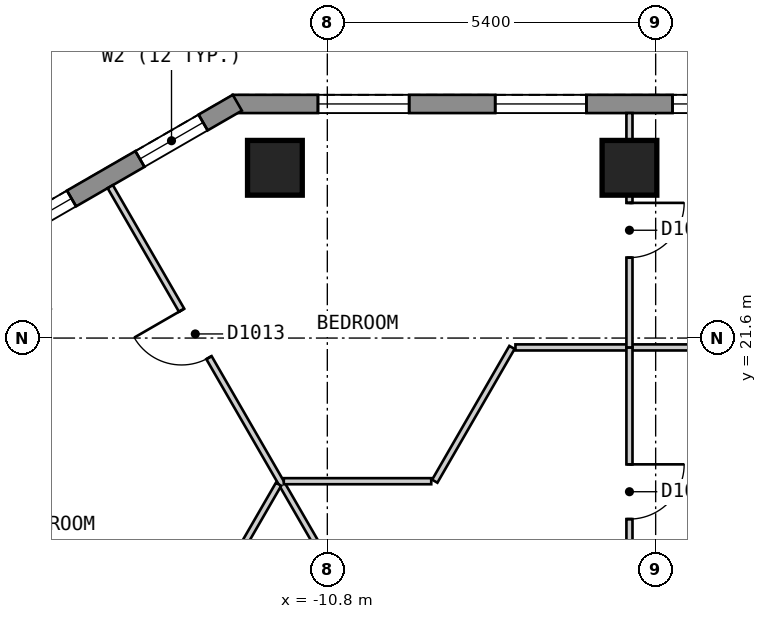
"""IFC4 building model, lengths in metres.
Left out: names, types, materials, properties, quantities, classifications, styles, units other than length and angle.
Written with IfcOpenShell. Run it as: python <this file> out.ifc"""

import sys

from ifc_helpers import new_model, si_unit, direction, frame, frame_2d, origin, origin_2d, place, context, subcontext, project, spatial, polyline, rectangle, outline, extrude, element, fill, save


model = new_model("IFC4")
c1 = context("Model", 3, precision=1e-05, world=origin(), true_north=direction((0.0, 1.0)))
c2 = subcontext(c1, "Body", "Model", "MODEL_VIEW")
j1 = project(units=[si_unit("LENGTHUNIT", "METRE"), si_unit("PLANEANGLEUNIT", "RADIAN")], contexts=[c1])
p1 = place(None, origin())
s1 = spatial("IfcSite", under=j1, at=p1, CompositionType="ELEMENT")
p2 = place(p1, origin())
s2 = spatial("IfcBuilding", under=s1, at=p2, CompositionType="ELEMENT")
p3 = place(p2, frame((0.0, 0.0, 126.6)))
s3 = spatial("IfcBuildingStorey", under=s2, at=p3, CompositionType="ELEMENT", Elevation=126.6)
for number, where, z_axis, x_axis in (
    (1, (-5.831, 24.4, 0.0), (0.0, 0.0, 1.0), (-1.0, 0.0, 0.0)),
    (2, (-11.662, 24.4, 0.0), (0.0, 0.0, 1.0), (-1.0, 0.0, 0.0)),
):
    element("IfcColumn", number, at=place(p3, frame(where, z_axis=z_axis, x_axis=x_axis)), inside=s3, PredefinedType="COLUMN", context=c2, shape_type="SweptSolid", body=[
        extrude(rectangle(XDim=0.9, YDim=0.9, at=origin_2d()), origin(), (0.0, 0.0, 1.0), 3.0),
    ])
p4 = place(p3, frame((12.355, 25.45, 0.0), z_axis=(0.0, 0.0, 1.0), x_axis=(-1.0, 0.0, 0.0)))
e3 = element("IfcWall", 3, at=p4, inside=s3, PredefinedType="SOLIDWALL", context=c2, shape_type="SweptSolid", body=[
    extrude(outline(polyline([(0.0, -0.15), (24.71, -0.15), (24.63, 0.15), (0.08, 0.15), (0.0, -0.15)])), origin(), (0.0, 0.0, 1.0), 2.7),
])
p5 = place(p4, frame((1.401, 0.0, 0.15)))
e4 = element("IfcOpeningElement", 4, at=p5, cuts=e3, PredefinedType="OPENING", context=c2, shape_type="SweptSolid", body=[
    extrude(rectangle(XDim=1.5, YDim=2.1, at=frame_2d((0.75, 1.05))), frame((0.0, 0.16, 0.0), z_axis=(0.0, -1.0, 0.0), x_axis=(1.0, 0.0, 0.0)), (0.0, 0.0, 1.0), 0.32),
])
p6 = place(p4, frame((4.316, 0.0, 0.15)))
e5 = element("IfcOpeningElement", 5, at=p6, cuts=e3, PredefinedType="OPENING", context=c2, shape_type="SweptSolid", body=[
    extrude(rectangle(XDim=1.5, YDim=2.1, at=frame_2d((0.75, 1.05))), frame((0.0, 0.16, 0.0), z_axis=(0.0, -1.0, 0.0), x_axis=(1.0, 0.0, 0.0)), (0.0, 0.0, 1.0), 0.32),
])
p7 = place(p4, frame((7.232, 0.0, 0.15)))
e6 = element("IfcOpeningElement", 6, at=p7, cuts=e3, PredefinedType="OPENING", context=c2, shape_type="SweptSolid", body=[
    extrude(rectangle(XDim=1.5, YDim=2.1, at=frame_2d((0.75, 1.05))), frame((0.0, 0.16, 0.0), z_axis=(0.0, -1.0, 0.0), x_axis=(1.0, 0.0, 0.0)), (0.0, 0.0, 1.0), 0.32),
])
p8 = place(p4, frame((10.147, 0.0, 0.15)))
e7 = element("IfcOpeningElement", 7, at=p8, cuts=e3, PredefinedType="OPENING", context=c2, shape_type="SweptSolid", body=[
    extrude(rectangle(XDim=1.5, YDim=2.1, at=frame_2d((0.75, 1.05))), frame((0.0, 0.16, 0.0), z_axis=(0.0, -1.0, 0.0), x_axis=(1.0, 0.0, 0.0)), (0.0, 0.0, 1.0), 0.32),
])
p9 = place(p4, frame((13.063, 0.0, 0.15)))
e8 = element("IfcOpeningElement", 8, at=p9, cuts=e3, PredefinedType="OPENING", context=c2, shape_type="SweptSolid", body=[
    extrude(rectangle(XDim=1.5, YDim=2.1, at=frame_2d((0.75, 1.05))), frame((0.0, 0.16, 0.0), z_axis=(0.0, -1.0, 0.0), x_axis=(1.0, 0.0, 0.0)), (0.0, 0.0, 1.0), 0.32),
])
p10 = place(p4, frame((15.978, 0.0, 0.15)))
e9 = element("IfcOpeningElement", 9, at=p10, cuts=e3, PredefinedType="OPENING", context=c2, shape_type="SweptSolid", body=[
    extrude(rectangle(XDim=1.5, YDim=2.1, at=frame_2d((0.75, 1.05))), frame((0.0, 0.16, 0.0), z_axis=(0.0, -1.0, 0.0), x_axis=(1.0, 0.0, 0.0)), (0.0, 0.0, 1.0), 0.32),
])
p11 = place(p4, frame((18.894, 0.0, 0.15)))
e10 = element("IfcOpeningElement", 10, at=p11, cuts=e3, PredefinedType="OPENING", context=c2, shape_type="SweptSolid", body=[
    extrude(rectangle(XDim=1.5, YDim=2.1, at=frame_2d((0.75, 1.05))), frame((0.0, 0.16, 0.0), z_axis=(0.0, -1.0, 0.0), x_axis=(1.0, 0.0, 0.0)), (0.0, 0.0, 1.0), 0.32),
])
p12 = place(p4, frame((21.809, 0.0, 0.15)))
e11 = element("IfcOpeningElement", 11, at=p12, cuts=e3, PredefinedType="OPENING", context=c2, shape_type="SweptSolid", body=[
    extrude(rectangle(XDim=1.5, YDim=2.1, at=frame_2d((0.75, 1.05))), frame((0.0, 0.16, 0.0), z_axis=(0.0, -1.0, 0.0), x_axis=(1.0, 0.0, 0.0)), (0.0, 0.0, 1.0), 0.32),
])
p13 = place(p3, frame((-12.28, 25.47, 0.0), z_axis=(0.0, 0.0, 1.0), x_axis=(-0.866022959057, -0.500004234368, 0.0)))
e12 = element("IfcWall", 12, at=p13, inside=s3, PredefinedType="SOLIDWALL", context=c2, shape_type="SweptSolid", body=[
    extrude(outline(polyline([(0.0, -0.15), (5.0, -0.15), (4.92, 0.15), (0.08, 0.15), (0.0, -0.15)])), origin(), (0.0, 0.0, 1.0), 2.7),
])
p14 = place(p13, frame((0.65, 0.0, 0.15)))
e13 = element("IfcOpeningElement", 13, at=p14, cuts=e12, PredefinedType="OPENING", context=c2, shape_type="SweptSolid", body=[
    extrude(rectangle(XDim=1.2, YDim=2.1, at=frame_2d((0.6, 1.05))), frame((0.0, 0.16, 0.0), z_axis=(0.0, -1.0, 0.0), x_axis=(1.0, 0.0, 0.0)), (0.0, 0.0, 1.0), 0.32),
])
p15 = place(p13, frame((3.149, 0.0, 0.15)))
e14 = element("IfcOpeningElement", 14, at=p15, cuts=e12, PredefinedType="OPENING", context=c2, shape_type="SweptSolid", body=[
    extrude(rectangle(XDim=1.2, YDim=2.1, at=frame_2d((0.6, 1.05))), frame((0.0, 0.16, 0.0), z_axis=(0.0, -1.0, 0.0), x_axis=(1.0, 0.0, 0.0)), (0.0, 0.0, 1.0), 0.32),
])
p16 = place(p3, frame((-14.37, 24.09, 0.0), z_axis=(0.0, 0.0, 1.0), x_axis=(0.50002438799, -0.866011322914, 0.0)))
e15 = element("IfcWall", 15, at=p16, inside=s3, PredefinedType="PARTITIONING", context=c2, shape_type="SweptSolid", body=[
    extrude(rectangle(XDim=10.266, YDim=0.1, at=frame_2d((5.133, 0.0))), origin(), (0.0, 0.0, 1.0), 2.7),
])
p17 = place(p16, frame((2.347, 0.0, 0.0)))
e16 = element("IfcOpeningElement", 16, at=p17, cuts=e15, PredefinedType="OPENING", context=c2, shape_type="SweptSolid", body=[
    extrude(rectangle(XDim=0.9, YDim=2.1, at=frame_2d((0.45, 1.05))), frame((0.0, 0.06, 0.0), z_axis=(0.0, -1.0, 0.0), x_axis=(1.0, 0.0, 0.0)), (0.0, 0.0, 1.0), 0.12),
])
p18 = place(p3, frame((-11.516, 19.246, 0.0), z_axis=(0.0, 0.0, 1.0), x_axis=(1.0, 0.0, 0.0)))
e17 = element("IfcWall", 17, at=p18, inside=s3, PredefinedType="PARTITIONING", context=c2, shape_type="SweptSolid", body=[
    extrude(rectangle(XDim=2.425, YDim=0.1, at=frame_2d((1.212, 0.0))), origin(), (0.0, 0.0, 1.0), 2.7),
])
p19 = place(p3, frame((-7.706, 21.446, 0.0), z_axis=(0.0, 0.0, 1.0), x_axis=(1.0, 0.0, 0.0)))
e18 = element("IfcWall", 18, at=p19, inside=s3, PredefinedType="PARTITIONING", context=c2, shape_type="SweptSolid", body=[
    extrude(rectangle(XDim=13.537, YDim=0.1, at=frame_2d((6.769, 0.0))), origin(), (0.0, 0.0, 1.0), 2.7),
])
p20 = place(p19, frame((4.35, 0.0, 0.0)))
e19 = element("IfcOpeningElement", 19, at=p20, cuts=e18, PredefinedType="OPENING", context=c2, shape_type="SweptSolid", body=[
    extrude(rectangle(XDim=0.9, YDim=2.1, at=frame_2d((0.45, 1.05))), frame((0.0, 0.06, 0.0), z_axis=(0.0, -1.0, 0.0), x_axis=(1.0, 0.0, 0.0)), (0.0, 0.0, 1.0), 0.12),
])
p21 = place(p3, frame((-9.033, 19.246, 0.0), z_axis=(0.0, 0.0, 1.0), x_axis=(0.499963722229, 0.866046347752, 0.0)))
e20 = element("IfcWall", 20, at=p21, inside=s3, PredefinedType="PARTITIONING", context=c2, shape_type="SweptSolid", body=[
    extrude(rectangle(XDim=2.54, YDim=0.1, at=frame_2d((1.27, 0.0))), origin(), (0.0, 0.0, 1.0), 2.7),
])
p22 = place(p3, frame((-14.222, 14.659, 0.0), z_axis=(0.0, 0.0, 1.0), x_axis=(0.500053212623, 0.865994679283, 0.0)))
e21 = element("IfcWall", 21, at=p22, inside=s3, PredefinedType="PARTITIONING", context=c2, shape_type="SweptSolid", body=[
    extrude(rectangle(XDim=5.239, YDim=0.1, at=frame_2d((2.62, 0.0))), origin(), (0.0, 0.0, 1.0), 2.7),
])
p23 = place(p22, frame((2.198, 0.0, 0.0)))
e22 = element("IfcOpeningElement", 22, at=p23, cuts=e21, PredefinedType="OPENING", context=c2, shape_type="SweptSolid", body=[
    extrude(rectangle(XDim=0.8, YDim=2.1, at=frame_2d((0.4, 1.05))), frame((0.0, 0.06, 0.0), z_axis=(0.0, -1.0, 0.0), x_axis=(1.0, 0.0, 0.0)), (0.0, 0.0, 1.0), 0.12),
])
p24 = place(p3, frame((-5.831, 16.9, 0.0), z_axis=(0.0, 0.0, 1.0), x_axis=(0.0, 1.0, 0.0)))
e23 = element("IfcWall", 23, at=p24, inside=s3, PredefinedType="PARTITIONING", context=c2, shape_type="SweptSolid", body=[
    extrude(rectangle(XDim=4.546, YDim=0.1, at=frame_2d((2.273, 0.0))), origin(), (0.0, 0.0, 1.0), 2.7),
])
p25 = place(p24, frame((1.723, 0.0, 0.0)))
e24 = element("IfcOpeningElement", 24, at=p25, cuts=e23, PredefinedType="OPENING", context=c2, shape_type="SweptSolid", body=[
    extrude(rectangle(XDim=0.9, YDim=2.1, at=frame_2d((0.45, 1.05))), frame((0.0, 0.06, 0.0), z_axis=(0.0, -1.0, 0.0), x_axis=(1.0, 0.0, 0.0)), (0.0, 0.0, 1.0), 0.12),
])
p26 = place(p3, frame((-5.831, 21.446, 0.0), z_axis=(0.0, 0.0, 1.0), x_axis=(0.0, 1.0, 0.0)))
e25 = element("IfcWall", 25, at=p26, inside=s3, PredefinedType="PARTITIONING", context=c2, shape_type="SweptSolid", body=[
    extrude(rectangle(XDim=3.854, YDim=0.1, at=frame_2d((1.927, 0.0))), origin(), (0.0, 0.0, 1.0), 2.7),
])
p27 = place(p26, frame((1.477, 0.0, 0.0)))
e26 = element("IfcOpeningElement", 26, at=p27, cuts=e25, PredefinedType="OPENING", context=c2, shape_type="SweptSolid", body=[
    extrude(rectangle(XDim=0.9, YDim=2.1, at=frame_2d((0.45, 1.05))), frame((0.0, 0.06, 0.0), z_axis=(0.0, -1.0, 0.0), x_axis=(1.0, 0.0, 0.0)), (0.0, 0.0, 1.0), 0.12),
])
p28 = place(p10, origin())
e27 = element("IfcWindow", 27, at=p28, inside=s3, PartitioningType="SINGLE_PANEL", PredefinedType="WINDOW", context=c2, shape_type="SweptSolid", body=[
    extrude(rectangle(XDim=1.5, YDim=2.1, at=frame_2d((0.75, 1.05))), frame((0.0, 0.03, 0.0), z_axis=(0.0, -1.0, 0.0), x_axis=(1.0, 0.0, 0.0)), (0.0, 0.0, 1.0), 0.06),
])
fill(e9, e27)
p29 = place(p11, origin())
e28 = element("IfcWindow", 28, at=p29, inside=s3, PartitioningType="SINGLE_PANEL", PredefinedType="WINDOW", context=c2, shape_type="SweptSolid", body=[
    extrude(rectangle(XDim=1.5, YDim=2.1, at=frame_2d((0.75, 1.05))), frame((0.0, 0.03, 0.0), z_axis=(0.0, -1.0, 0.0), x_axis=(1.0, 0.0, 0.0)), (0.0, 0.0, 1.0), 0.06),
])
fill(e10, e28)
p30 = place(p12, origin())
e29 = element("IfcWindow", 29, at=p30, inside=s3, PartitioningType="SINGLE_PANEL", PredefinedType="WINDOW", context=c2, shape_type="SweptSolid", body=[
    extrude(rectangle(XDim=1.5, YDim=2.1, at=frame_2d((0.75, 1.05))), frame((0.0, 0.03, 0.0), z_axis=(0.0, -1.0, 0.0), x_axis=(1.0, 0.0, 0.0)), (0.0, 0.0, 1.0), 0.06),
])
fill(e11, e29)
p31 = place(p14, origin())
e30 = element("IfcWindow", 30, at=p31, inside=s3, PartitioningType="SINGLE_PANEL", PredefinedType="WINDOW", context=c2, shape_type="SweptSolid", body=[
    extrude(rectangle(XDim=1.2, YDim=2.1, at=frame_2d((0.6, 1.05))), frame((0.0, 0.03, 0.0), z_axis=(0.0, -1.0, 0.0), x_axis=(1.0, 0.0, 0.0)), (0.0, 0.0, 1.0), 0.06),
])
fill(e13, e30)
p32 = place(p15, origin())
e31 = element("IfcWindow", 31, at=p32, inside=s3, PartitioningType="SINGLE_PANEL", PredefinedType="WINDOW", context=c2, shape_type="SweptSolid", body=[
    extrude(rectangle(XDim=1.2, YDim=2.1, at=frame_2d((0.6, 1.05))), frame((0.0, 0.03, 0.0), z_axis=(0.0, -1.0, 0.0), x_axis=(1.0, 0.0, 0.0)), (0.0, 0.0, 1.0), 0.06),
])
fill(e14, e31)
p33 = place(p25, origin())
e32 = element("IfcDoor", 32, at=p33, inside=s3, OperationType="SINGLE_SWING_RIGHT", PredefinedType="DOOR", context=c2, shape_type="SweptSolid", body=[
    extrude(rectangle(XDim=0.9, YDim=2.1, at=frame_2d((0.45, 1.05))), frame((0.0, 0.025, 0.0), z_axis=(0.0, -1.0, 0.0), x_axis=(1.0, 0.0, 0.0)), (0.0, 0.0, 1.0), 0.05),
])
fill(e24, e32)
p34 = place(p27, origin())
e33 = element("IfcDoor", 33, at=p34, inside=s3, OperationType="SINGLE_SWING_RIGHT", PredefinedType="DOOR", context=c2, shape_type="SweptSolid", body=[
    extrude(rectangle(XDim=0.9, YDim=2.1, at=frame_2d((0.45, 1.05))), frame((0.0, 0.025, 0.0), z_axis=(0.0, -1.0, 0.0), x_axis=(1.0, 0.0, 0.0)), (0.0, 0.0, 1.0), 0.05),
])
fill(e26, e33)
p35 = place(p17, origin())
e34 = element("IfcDoor", 34, at=p35, inside=s3, OperationType="SINGLE_SWING_LEFT", PredefinedType="DOOR", context=c2, shape_type="SweptSolid", body=[
    extrude(rectangle(XDim=0.9, YDim=2.1, at=frame_2d((0.45, 1.05))), frame((0.0, 0.025, 0.0), z_axis=(0.0, -1.0, 0.0), x_axis=(1.0, 0.0, 0.0)), (0.0, 0.0, 1.0), 0.05),
])
fill(e16, e34)
save(model, sys.argv[1])
